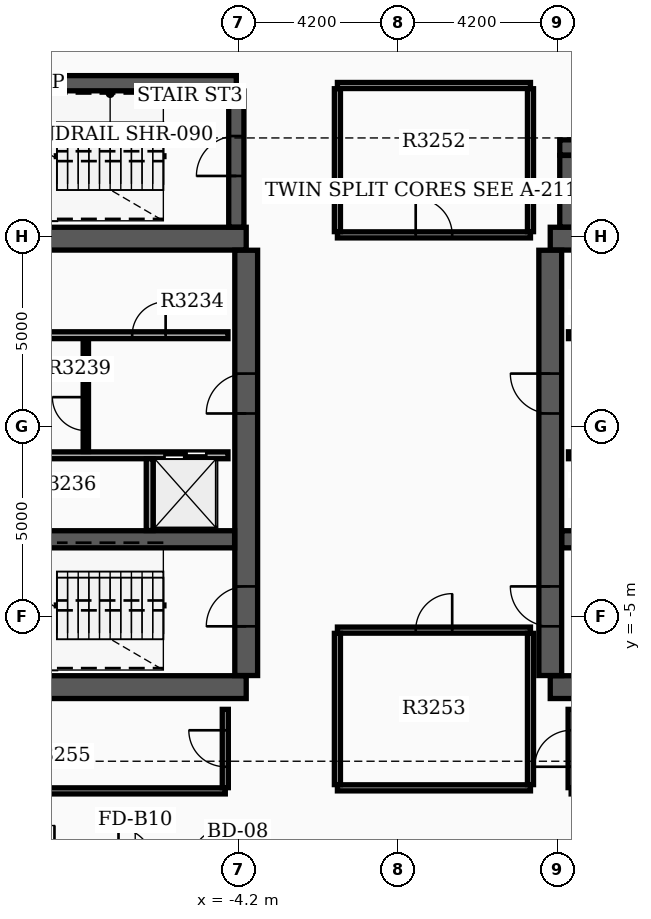
"""IFC4 building model, lengths in metres.
Left out: names, types, materials, properties, quantities, classifications, styles, units other than length and angle.
Written with IfcOpenShell. Run it as: python <this file> out.ifc"""

import sys

from ifc_helpers import new_model, si_unit, direction, frame, frame_2d, origin, place, context, subcontext, project, spatial, rectangle, extrude, element, fill, save


model = new_model("IFC4")
c1 = context("Model", 3, precision=1e-05, world=origin(), true_north=direction((0.0, 1.0)))
c2 = subcontext(c1, "Body", "Model", "MODEL_VIEW")
j1 = project(units=[si_unit("LENGTHUNIT", "METRE"), si_unit("PLANEANGLEUNIT", "RADIAN")], contexts=[c1])
p1 = place(None, origin())
s1 = spatial("IfcSite", under=j1, at=p1, CompositionType="ELEMENT")
p2 = place(p1, origin())
s2 = spatial("IfcBuilding", under=s1, at=p2, CompositionType="ELEMENT")
p3 = place(p2, frame((0.0, 0.0, 205.2)))
s3 = spatial("IfcBuildingStorey", under=s2, at=p3, CompositionType="ELEMENT", Elevation=205.2)
for number, where, z_axis, x_axis in (
    (1, (-12.4, -6.85, 0.0), (0.0, 0.0, 1.0), (1.0, 0.0, 0.0)),
    (2, (-12.4, 4.95, 0.0), (0.0, 0.0, 1.0), (1.0, 0.0, 0.0)),
):
    element("IfcWall", number, at=place(p3, frame(where, z_axis=z_axis, x_axis=x_axis)), inside=s3, PredefinedType="SHEAR", context=c2, shape_type="SweptSolid", body=[
        extrude(rectangle(XDim=8.4, YDim=0.6, at=frame_2d((4.2, 0.0))), origin(), (0.0, 0.0, 1.0), 3.7),
    ])
p4 = place(p3, frame((-4.0, -6.545, 0.0), z_axis=(0.0, 0.0, 1.0), x_axis=(0.0, 1.0, 0.0)))
e3 = element("IfcWall", 3, at=p4, inside=s3, PredefinedType="SHEAR", context=c2, shape_type="SweptSolid", body=[
    extrude(rectangle(XDim=11.19, YDim=0.6, at=frame_2d((5.595, 0.0))), origin(), (0.0, 0.0, 1.0), 3.7),
])
p5 = place(p4, frame((1.295, 0.0, 0.0)))
e4 = element("IfcOpeningElement", 4, at=p5, cuts=e3, PredefinedType="OPENING", context=c2, shape_type="SweptSolid", body=[
    extrude(rectangle(XDim=1.05, YDim=2.15, at=frame_2d((0.525, 1.075))), frame((0.0, 0.31, 0.0), z_axis=(0.0, -1.0, 0.0), x_axis=(1.0, 0.0, 0.0)), (0.0, 0.0, 1.0), 0.62),
])
p6 = place(p4, frame((6.895, 0.0, 0.0)))
e5 = element("IfcOpeningElement", 5, at=p6, cuts=e3, PredefinedType="OPENING", context=c2, shape_type="SweptSolid", body=[
    extrude(rectangle(XDim=1.05, YDim=2.15, at=frame_2d((0.525, 1.075))), frame((0.0, 0.31, 0.0), z_axis=(0.0, -1.0, 0.0), x_axis=(1.0, 0.0, 0.0)), (0.0, 0.0, 1.0), 0.62),
])
p7 = place(p3, frame((-12.095, -2.96, 0.0), z_axis=(0.0, 0.0, 1.0), x_axis=(1.0, 0.0, 0.0)))
e6 = element("IfcWall", 6, at=p7, inside=s3, PredefinedType="SHEAR", context=c2, shape_type="SweptSolid", body=[
    extrude(rectangle(XDim=7.79, YDim=0.45, at=frame_2d((3.895, 0.0))), origin(), (0.0, 0.0, 1.0), 3.7),
])
for number, where, z_axis, x_axis in (
    (7, (4.0, -6.85, 0.0), (0.0, 0.0, 1.0), (1.0, 0.0, 0.0)),
    (8, (4.0, 4.95, 0.0), (0.0, 0.0, 1.0), (1.0, 0.0, 0.0)),
):
    element("IfcWall", number, at=place(p3, frame(where, z_axis=z_axis, x_axis=x_axis)), inside=s3, PredefinedType="SHEAR", context=c2, shape_type="SweptSolid", body=[
        extrude(rectangle(XDim=8.4, YDim=0.6, at=frame_2d((4.2, 0.0))), origin(), (0.0, 0.0, 1.0), 3.7),
    ])
p8 = place(p3, frame((4.0, -6.545, 0.0), z_axis=(0.0, 0.0, 1.0), x_axis=(0.0, 1.0, 0.0)))
e9 = element("IfcWall", 9, at=p8, inside=s3, PredefinedType="SHEAR", context=c2, shape_type="SweptSolid", body=[
    extrude(rectangle(XDim=11.19, YDim=0.6, at=frame_2d((5.595, 0.0))), origin(), (0.0, 0.0, 1.0), 3.7),
])
p9 = place(p8, frame((1.295, 0.0, 0.0)))
e10 = element("IfcOpeningElement", 10, at=p9, cuts=e9, PredefinedType="OPENING", context=c2, shape_type="SweptSolid", body=[
    extrude(rectangle(XDim=1.05, YDim=2.15, at=frame_2d((0.525, 1.075))), frame((0.0, 0.31, 0.0), z_axis=(0.0, -1.0, 0.0), x_axis=(1.0, 0.0, 0.0)), (0.0, 0.0, 1.0), 0.62),
])
p10 = place(p8, frame((6.895, 0.0, 0.0)))
e11 = element("IfcOpeningElement", 11, at=p10, cuts=e9, PredefinedType="OPENING", context=c2, shape_type="SweptSolid", body=[
    extrude(rectangle(XDim=1.05, YDim=2.15, at=frame_2d((0.525, 1.075))), frame((0.0, 0.31, 0.0), z_axis=(0.0, -1.0, 0.0), x_axis=(1.0, 0.0, 0.0)), (0.0, 0.0, 1.0), 0.62),
])
p11 = place(p3, frame((4.305, -2.96, 0.0), z_axis=(0.0, 0.0, 1.0), x_axis=(1.0, 0.0, 0.0)))
e12 = element("IfcWall", 12, at=p11, inside=s3, PredefinedType="SHEAR", context=c2, shape_type="SweptSolid", body=[
    extrude(rectangle(XDim=7.79, YDim=0.45, at=frame_2d((3.895, 0.0))), origin(), (0.0, 0.0, 1.0), 3.7),
])
p12 = place(p3, frame((-12.22, 9.04, 0.0), z_axis=(0.0, 0.0, 1.0), x_axis=(1.0, 0.0, 0.0)))
e13 = element("IfcWall", 13, at=p12, inside=s3, PredefinedType="SHEAR", context=c2, shape_type="SweptSolid", body=[
    extrude(rectangle(XDim=7.96, YDim=0.4, at=frame_2d((3.98, 0.0))), origin(), (0.0, 0.0, 1.0), 3.7),
])
p13 = place(p3, frame((-4.26, 5.255, 0.0), z_axis=(0.0, 0.0, 1.0), x_axis=(0.0, 1.0, 0.0)))
e14 = element("IfcWall", 14, at=p13, inside=s3, PredefinedType="SHEAR", context=c2, shape_type="SweptSolid", body=[
    extrude(rectangle(XDim=3.58, YDim=0.4, at=frame_2d((1.79, 0.0))), origin(), (0.0, 0.0, 1.0), 3.7),
])
p14 = place(p13, frame((1.345, 0.0, 0.0)))
e15 = element("IfcOpeningElement", 15, at=p14, cuts=e14, PredefinedType="OPENING", context=c2, shape_type="SweptSolid", body=[
    extrude(rectangle(XDim=1.05, YDim=2.15, at=frame_2d((0.525, 1.075))), frame((0.0, 0.21, 0.0), z_axis=(0.0, -1.0, 0.0), x_axis=(1.0, 0.0, 0.0)), (0.0, 0.0, 1.0), 0.42),
])
p15 = place(p3, frame((4.45, 5.255, 0.0), z_axis=(0.0, 0.0, 1.0), x_axis=(0.0, 1.0, 0.0)))
e16 = element("IfcWall", 16, at=p15, inside=s3, PredefinedType="SHEAR", context=c2, shape_type="SweptSolid", body=[
    extrude(rectangle(XDim=1.885, YDim=0.4, at=frame_2d((0.942, 0.0))), origin(), (0.0, 0.0, 1.0), 3.7),
])
p16 = place(p3, frame((4.25, 7.35, 0.0), z_axis=(0.0, 0.0, 1.0), x_axis=(1.0, 0.0, 0.0)))
e17 = element("IfcWall", 17, at=p16, inside=s3, PredefinedType="SHEAR", context=c2, shape_type="SweptSolid", body=[
    extrude(rectangle(XDim=5.4, YDim=0.4, at=frame_2d((2.7, 0.0))), origin(), (0.0, 0.0, 1.0), 3.7),
])
p17 = place(p3, frame((-11.9, 2.41, 0.0), z_axis=(0.0, 0.0, 1.0), x_axis=(1.0, 0.0, 0.0)))
e18 = element("IfcWall", 18, at=p17, inside=s3, PredefinedType="SOLIDWALL", context=c2, shape_type="SweptSolid", body=[
    extrude(rectangle(XDim=7.42, YDim=0.18, at=frame_2d((3.71, 0.0))), origin(), (0.0, 0.0, 1.0), 3.17),
])
p18 = place(p17, frame((0.55, 0.0, 0.0)))
e19 = element("IfcOpeningElement", 19, at=p18, cuts=e18, PredefinedType="OPENING", context=c2, shape_type="SweptSolid", body=[
    extrude(rectangle(XDim=1.1, YDim=2.15, at=frame_2d((0.55, 1.075))), frame((0.0, 0.1, 0.0), z_axis=(0.0, -1.0, 0.0), x_axis=(1.0, 0.0, 0.0)), (0.0, 0.0, 1.0), 0.2),
])
p19 = place(p17, frame((4.9, 0.0, 0.0)))
e20 = element("IfcOpeningElement", 20, at=p19, cuts=e18, PredefinedType="OPENING", context=c2, shape_type="SweptSolid", body=[
    extrude(rectangle(XDim=0.88, YDim=2.1, at=frame_2d((0.44, 1.05))), frame((0.0, 0.1, 0.0), z_axis=(0.0, -1.0, 0.0), x_axis=(1.0, 0.0, 0.0)), (0.0, 0.0, 1.0), 0.2),
])
p20 = place(p3, frame((4.48, 2.41, 0.0), z_axis=(0.0, 0.0, 1.0), x_axis=(1.0, 0.0, 0.0)))
e21 = element("IfcWall", 21, at=p20, inside=s3, PredefinedType="SOLIDWALL", context=c2, shape_type="SweptSolid", body=[
    extrude(rectangle(XDim=7.42, YDim=0.18, at=frame_2d((3.71, 0.0))), origin(), (0.0, 0.0, 1.0), 3.17),
])
p21 = place(p20, frame((5.67, 0.0, 0.0)))
e22 = element("IfcOpeningElement", 22, at=p21, cuts=e21, PredefinedType="OPENING", context=c2, shape_type="SweptSolid", body=[
    extrude(rectangle(XDim=1.1, YDim=2.15, at=frame_2d((0.55, 1.075))), frame((0.0, 0.1, 0.0), z_axis=(0.0, -1.0, 0.0), x_axis=(1.0, 0.0, 0.0)), (0.0, 0.0, 1.0), 0.2),
])
p22 = place(p20, frame((1.6, 0.0, 0.0)))
e23 = element("IfcOpeningElement", 23, at=p22, cuts=e21, PredefinedType="OPENING", context=c2, shape_type="SweptSolid", body=[
    extrude(rectangle(XDim=0.88, YDim=2.1, at=frame_2d((0.44, 1.05))), frame((0.0, 0.1, 0.0), z_axis=(0.0, -1.0, 0.0), x_axis=(1.0, 0.0, 0.0)), (0.0, 0.0, 1.0), 0.2),
])
p23 = place(p3, frame((-11.9, -0.75, 0.0), z_axis=(0.0, 0.0, 1.0), x_axis=(1.0, 0.0, 0.0)))
e24 = element("IfcWall", 24, at=p23, inside=s3, PredefinedType="SOLIDWALL", context=c2, shape_type="SweptSolid", body=[
    extrude(rectangle(XDim=7.42, YDim=0.18, at=frame_2d((3.71, 0.0))), origin(), (0.0, 0.0, 1.0), 3.17),
])
p24 = place(p23, frame((5.75, 0.0, 0.0)))
e25 = element("IfcOpeningElement", 25, at=p24, cuts=e24, PredefinedType="OPENING", context=c2, shape_type="SweptSolid", body=[
    extrude(rectangle(XDim=1.1, YDim=2.15, at=frame_2d((0.55, 1.075))), frame((0.0, 0.1, 0.0), z_axis=(0.0, -1.0, 0.0), x_axis=(1.0, 0.0, 0.0)), (0.0, 0.0, 1.0), 0.2),
])
p25 = place(p23, frame((1.6, 0.0, 0.0)))
e26 = element("IfcOpeningElement", 26, at=p25, cuts=e24, PredefinedType="OPENING", context=c2, shape_type="SweptSolid", body=[
    extrude(rectangle(XDim=0.88, YDim=2.1, at=frame_2d((0.44, 1.05))), frame((0.0, 0.1, 0.0), z_axis=(0.0, -1.0, 0.0), x_axis=(1.0, 0.0, 0.0)), (0.0, 0.0, 1.0), 0.2),
])
p26 = place(p3, frame((4.48, -0.75, 0.0), z_axis=(0.0, 0.0, 1.0), x_axis=(1.0, 0.0, 0.0)))
e27 = element("IfcWall", 27, at=p26, inside=s3, PredefinedType="SOLIDWALL", context=c2, shape_type="SweptSolid", body=[
    extrude(rectangle(XDim=7.42, YDim=0.18, at=frame_2d((3.71, 0.0))), origin(), (0.0, 0.0, 1.0), 3.17),
])
p27 = place(p26, frame((3.92, 0.0, 0.0)))
e28 = element("IfcOpeningElement", 28, at=p27, cuts=e27, PredefinedType="OPENING", context=c2, shape_type="SweptSolid", body=[
    extrude(rectangle(XDim=1.1, YDim=2.15, at=frame_2d((0.55, 1.075))), frame((0.0, 0.1, 0.0), z_axis=(0.0, -1.0, 0.0), x_axis=(1.0, 0.0, 0.0)), (0.0, 0.0, 1.0), 0.2),
])
p28 = place(p26, frame((5.82, 0.0, 0.0)))
e29 = element("IfcOpeningElement", 29, at=p28, cuts=e27, PredefinedType="OPENING", context=c2, shape_type="SweptSolid", body=[
    extrude(rectangle(XDim=1.1, YDim=2.15, at=frame_2d((0.55, 1.075))), frame((0.0, 0.1, 0.0), z_axis=(0.0, -1.0, 0.0), x_axis=(1.0, 0.0, 0.0)), (0.0, 0.0, 1.0), 0.2),
])
p29 = place(p26, frame((1.6, 0.0, 0.0)))
e30 = element("IfcOpeningElement", 30, at=p29, cuts=e27, PredefinedType="OPENING", context=c2, shape_type="SweptSolid", body=[
    extrude(rectangle(XDim=0.88, YDim=2.1, at=frame_2d((0.44, 1.05))), frame((0.0, 0.1, 0.0), z_axis=(0.0, -1.0, 0.0), x_axis=(1.0, 0.0, 0.0)), (0.0, 0.0, 1.0), 0.2),
])
p30 = place(p3, frame((-6.54, -2.73, 0.0), z_axis=(0.0, 0.0, 1.0), x_axis=(0.0, 1.0, 0.0)))
e31 = element("IfcWall", 31, at=p30, inside=s3, PredefinedType="SOLIDWALL", context=c2, shape_type="SweptSolid", body=[
    extrude(rectangle(XDim=1.89, YDim=0.18, at=frame_2d((0.945, 0.0))), origin(), (0.0, 0.0, 1.0), 3.17),
])
p31 = place(p3, frame((-8.22, -0.65, 0.0), z_axis=(0.0, 0.0, 1.0), x_axis=(0.0, 1.0, 0.0)))
e32 = element("IfcWall", 32, at=p31, inside=s3, PredefinedType="SOLIDWALL", context=c2, shape_type="SweptSolid", body=[
    extrude(rectangle(XDim=2.96, YDim=0.14, at=frame_2d((1.48, 0.0))), origin(), (0.0, 0.0, 1.0), 3.17),
])
p32 = place(p31, frame((0.55, 0.0, 0.0)))
e33 = element("IfcOpeningElement", 33, at=p32, cuts=e32, PredefinedType="OPENING", context=c2, shape_type="SweptSolid", body=[
    extrude(rectangle(XDim=0.88, YDim=2.1, at=frame_2d((0.44, 1.05))), frame((0.0, 0.08, 0.0), z_axis=(0.0, -1.0, 0.0), x_axis=(1.0, 0.0, 0.0)), (0.0, 0.0, 1.0), 0.16),
])
p33 = place(p3, frame((-1.6, 5.05, 0.0), z_axis=(0.0, 0.0, 1.0), x_axis=(1.0, 0.0, 0.0)))
e34 = element("IfcWall", 34, at=p33, inside=s3, PredefinedType="PARTITIONING", context=c2, shape_type="SweptSolid", body=[
    extrude(rectangle(XDim=5.08, YDim=0.16, at=frame_2d((2.54, 0.0))), origin(), (0.0, 0.0, 1.0), 3.17),
])
p34 = place(p33, frame((2.06, 0.0, 0.0)))
e35 = element("IfcOpeningElement", 35, at=p34, cuts=e34, PredefinedType="OPENING", context=c2, shape_type="SweptSolid", body=[
    extrude(rectangle(XDim=0.96, YDim=2.15, at=frame_2d((0.48, 1.075))), frame((0.0, 0.09, 0.0), z_axis=(0.0, -1.0, 0.0), x_axis=(1.0, 0.0, 0.0)), (0.0, 0.0, 1.0), 0.18),
])
p35 = place(p3, frame((-1.6, 8.98, 0.0), z_axis=(0.0, 0.0, 1.0), x_axis=(1.0, 0.0, 0.0)))
e36 = element("IfcWall", 36, at=p35, inside=s3, PredefinedType="PARTITIONING", context=c2, shape_type="SweptSolid", body=[
    extrude(rectangle(XDim=5.08, YDim=0.16, at=frame_2d((2.54, 0.0))), origin(), (0.0, 0.0, 1.0), 3.17),
])
for number, where, z_axis, x_axis in (
    (37, (-1.6, 5.135, 0.0), (0.0, 0.0, 1.0), (0.0, 1.0, 0.0)),
    (38, (3.48, 5.135, 0.0), (0.0, 0.0, 1.0), (0.0, 1.0, 0.0)),
):
    element("IfcWall", number, at=place(p3, frame(where, z_axis=z_axis, x_axis=x_axis)), inside=s3, PredefinedType="PARTITIONING", context=c2, shape_type="SweptSolid", body=[
        extrude(rectangle(XDim=3.76, YDim=0.16, at=frame_2d((1.88, 0.0))), origin(), (0.0, 0.0, 1.0), 3.17),
    ])
p36 = place(p3, frame((-1.6, -9.5, 0.0), z_axis=(0.0, 0.0, 1.0), x_axis=(1.0, 0.0, 0.0)))
e39 = element("IfcWall", 39, at=p36, inside=s3, PredefinedType="PARTITIONING", context=c2, shape_type="SweptSolid", body=[
    extrude(rectangle(XDim=5.08, YDim=0.16, at=frame_2d((2.54, 0.0))), origin(), (0.0, 0.0, 1.0), 3.17),
])
p37 = place(p3, frame((-1.6, -5.35, 0.0), z_axis=(0.0, 0.0, 1.0), x_axis=(1.0, 0.0, 0.0)))
e40 = element("IfcWall", 40, at=p37, inside=s3, PredefinedType="PARTITIONING", context=c2, shape_type="SweptSolid", body=[
    extrude(rectangle(XDim=5.08, YDim=0.16, at=frame_2d((2.54, 0.0))), origin(), (0.0, 0.0, 1.0), 3.17),
])
p38 = place(p37, frame((2.06, 0.0, 0.0)))
e41 = element("IfcOpeningElement", 41, at=p38, cuts=e40, PredefinedType="OPENING", context=c2, shape_type="SweptSolid", body=[
    extrude(rectangle(XDim=0.96, YDim=2.15, at=frame_2d((0.48, 1.075))), frame((0.0, 0.09, 0.0), z_axis=(0.0, -1.0, 0.0), x_axis=(1.0, 0.0, 0.0)), (0.0, 0.0, 1.0), 0.18),
])
for number, where, z_axis, x_axis in (
    (42, (-1.6, -9.415, 0.0), (0.0, 0.0, 1.0), (0.0, 1.0, 0.0)),
    (43, (3.48, -9.415, 0.0), (0.0, 0.0, 1.0), (0.0, 1.0, 0.0)),
):
    element("IfcWall", number, at=place(p3, frame(where, z_axis=z_axis, x_axis=x_axis)), inside=s3, PredefinedType="PARTITIONING", context=c2, shape_type="SweptSolid", body=[
        extrude(rectangle(XDim=3.98, YDim=0.16, at=frame_2d((1.99, 0.0))), origin(), (0.0, 0.0, 1.0), 3.17),
    ])
p39 = place(p3, frame((4.55, -9.58, 0.0), z_axis=(0.0, 0.0, 1.0), x_axis=(1.0, 0.0, 0.0)))
e44 = element("IfcWall", 44, at=p39, inside=s3, PredefinedType="PARTITIONING", context=c2, shape_type="SweptSolid", body=[
    extrude(rectangle(XDim=8.1, YDim=0.16, at=frame_2d((4.05, 0.0))), origin(), (0.0, 0.0, 1.0), 3.17),
])
p40 = place(p3, frame((4.55, -9.495, 0.0), z_axis=(0.0, 0.0, 1.0), x_axis=(0.0, 1.0, 0.0)))
e45 = element("IfcWall", 45, at=p40, inside=s3, PredefinedType="PARTITIONING", context=c2, shape_type="SweptSolid", body=[
    extrude(rectangle(XDim=2.06, YDim=0.16, at=frame_2d((1.03, 0.0))), origin(), (0.0, 0.0, 1.0), 3.17),
])
p41 = place(p40, frame((0.55, 0.0, 0.0)))
e46 = element("IfcOpeningElement", 46, at=p41, cuts=e45, PredefinedType="OPENING", context=c2, shape_type="SweptSolid", body=[
    extrude(rectangle(XDim=0.96, YDim=2.15, at=frame_2d((0.48, 1.075))), frame((0.0, 0.09, 0.0), z_axis=(0.0, -1.0, 0.0), x_axis=(1.0, 0.0, 0.0)), (0.0, 0.0, 1.0), 0.18),
])
p42 = place(p3, frame((-12.65, -9.58, 0.0), z_axis=(0.0, 0.0, 1.0), x_axis=(1.0, 0.0, 0.0)))
e47 = element("IfcWall", 47, at=p42, inside=s3, PredefinedType="PARTITIONING", context=c2, shape_type="SweptSolid", body=[
    extrude(rectangle(XDim=8.1, YDim=0.16, at=frame_2d((4.05, 0.0))), origin(), (0.0, 0.0, 1.0), 3.17),
])
p43 = place(p3, frame((-4.55, -9.495, 0.0), z_axis=(0.0, 0.0, 1.0), x_axis=(0.0, 1.0, 0.0)))
e48 = element("IfcWall", 48, at=p43, inside=s3, PredefinedType="PARTITIONING", context=c2, shape_type="SweptSolid", body=[
    extrude(rectangle(XDim=2.06, YDim=0.16, at=frame_2d((1.03, 0.0))), origin(), (0.0, 0.0, 1.0), 3.17),
])
p44 = place(p43, frame((0.55, 0.0, 0.0)))
e49 = element("IfcOpeningElement", 49, at=p44, cuts=e48, PredefinedType="OPENING", context=c2, shape_type="SweptSolid", body=[
    extrude(rectangle(XDim=0.96, YDim=2.15, at=frame_2d((0.48, 1.075))), frame((0.0, 0.09, 0.0), z_axis=(0.0, -1.0, 0.0), x_axis=(1.0, 0.0, 0.0)), (0.0, 0.0, 1.0), 0.18),
])
p45 = place(p5, origin())
e50 = element("IfcDoor", 50, at=p45, inside=s3, OperationType="SINGLE_SWING_LEFT", PredefinedType="DOOR", context=c2, shape_type="SweptSolid", body=[
    extrude(rectangle(XDim=1.05, YDim=2.15, at=frame_2d((0.525, 1.075))), frame((0.0, 0.025, 0.0), z_axis=(0.0, -1.0, 0.0), x_axis=(1.0, 0.0, 0.0)), (0.0, 0.0, 1.0), 0.05),
])
fill(e4, e50)
p46 = place(p9, origin())
e51 = element("IfcDoor", 51, at=p46, inside=s3, OperationType="SINGLE_SWING_RIGHT", PredefinedType="DOOR", context=c2, shape_type="SweptSolid", body=[
    extrude(rectangle(XDim=1.05, YDim=2.15, at=frame_2d((0.525, 1.075))), frame((0.0, 0.025, 0.0), z_axis=(0.0, -1.0, 0.0), x_axis=(1.0, 0.0, 0.0)), (0.0, 0.0, 1.0), 0.05),
])
fill(e10, e51)
p47 = place(p6, origin())
e52 = element("IfcDoor", 52, at=p47, inside=s3, OperationType="SINGLE_SWING_LEFT", PredefinedType="DOOR", context=c2, shape_type="SweptSolid", body=[
    extrude(rectangle(XDim=1.05, YDim=2.15, at=frame_2d((0.525, 1.075))), frame((0.0, 0.025, 0.0), z_axis=(0.0, -1.0, 0.0), x_axis=(1.0, 0.0, 0.0)), (0.0, 0.0, 1.0), 0.05),
])
fill(e5, e52)
p48 = place(p10, origin())
e53 = element("IfcDoor", 53, at=p48, inside=s3, OperationType="SINGLE_SWING_RIGHT", PredefinedType="DOOR", context=c2, shape_type="SweptSolid", body=[
    extrude(rectangle(XDim=1.05, YDim=2.15, at=frame_2d((0.525, 1.075))), frame((0.0, 0.025, 0.0), z_axis=(0.0, -1.0, 0.0), x_axis=(1.0, 0.0, 0.0)), (0.0, 0.0, 1.0), 0.05),
])
fill(e11, e53)
p49 = place(p14, origin())
e54 = element("IfcDoor", 54, at=p49, inside=s3, OperationType="SINGLE_SWING_LEFT", PredefinedType="DOOR", context=c2, shape_type="SweptSolid", body=[
    extrude(rectangle(XDim=1.05, YDim=2.15, at=frame_2d((0.525, 1.075))), frame((0.0, 0.025, 0.0), z_axis=(0.0, -1.0, 0.0), x_axis=(1.0, 0.0, 0.0)), (0.0, 0.0, 1.0), 0.05),
])
fill(e15, e54)
p50 = place(p24, origin())
e55 = element("IfcDoor", 55, at=p50, inside=s3, OperationType="DOUBLE_DOOR_SLIDING", PredefinedType="DOOR", context=c2, shape_type="SweptSolid", body=[
    extrude(rectangle(XDim=1.1, YDim=2.15, at=frame_2d((0.55, 1.075))), frame((0.0, 0.025, 0.0), z_axis=(0.0, -1.0, 0.0), x_axis=(1.0, 0.0, 0.0)), (0.0, 0.0, 1.0), 0.05),
])
fill(e25, e55)
p51 = place(p19, origin())
e56 = element("IfcDoor", 56, at=p51, inside=s3, OperationType="SINGLE_SWING_RIGHT", PredefinedType="DOOR", context=c2, shape_type="SweptSolid", body=[
    extrude(rectangle(XDim=0.88, YDim=2.1, at=frame_2d((0.44, 1.05))), frame((0.0, 0.025, 0.0), z_axis=(0.0, -1.0, 0.0), x_axis=(1.0, 0.0, 0.0)), (0.0, 0.0, 1.0), 0.05),
])
fill(e20, e56)
p52 = place(p32, origin())
e57 = element("IfcDoor", 57, at=p52, inside=s3, OperationType="SINGLE_SWING_RIGHT", PredefinedType="DOOR", context=c2, shape_type="SweptSolid", body=[
    extrude(rectangle(XDim=0.88, YDim=2.1, at=frame_2d((0.44, 1.05))), frame((0.0, 0.025, 0.0), z_axis=(0.0, -1.0, 0.0), x_axis=(1.0, 0.0, 0.0)), (0.0, 0.0, 1.0), 0.05),
])
fill(e33, e57)
p53 = place(p34, origin())
e58 = element("IfcDoor", 58, at=p53, inside=s3, OperationType="SINGLE_SWING_LEFT", PredefinedType="DOOR", context=c2, shape_type="SweptSolid", body=[
    extrude(rectangle(XDim=0.96, YDim=2.15, at=frame_2d((0.48, 1.075))), frame((0.0, 0.025, 0.0), z_axis=(0.0, -1.0, 0.0), x_axis=(1.0, 0.0, 0.0)), (0.0, 0.0, 1.0), 0.05),
])
fill(e35, e58)
p54 = place(p38, origin())
e59 = element("IfcDoor", 59, at=p54, inside=s3, OperationType="SINGLE_SWING_RIGHT", PredefinedType="DOOR", context=c2, shape_type="SweptSolid", body=[
    extrude(rectangle(XDim=0.96, YDim=2.15, at=frame_2d((0.48, 1.075))), frame((0.0, 0.025, 0.0), z_axis=(0.0, -1.0, 0.0), x_axis=(1.0, 0.0, 0.0)), (0.0, 0.0, 1.0), 0.05),
])
fill(e41, e59)
p55 = place(p41, origin())
e60 = element("IfcDoor", 60, at=p55, inside=s3, OperationType="SINGLE_SWING_LEFT", PredefinedType="DOOR", context=c2, shape_type="SweptSolid", body=[
    extrude(rectangle(XDim=0.96, YDim=2.15, at=frame_2d((0.48, 1.075))), frame((0.0, 0.025, 0.0), z_axis=(0.0, -1.0, 0.0), x_axis=(1.0, 0.0, 0.0)), (0.0, 0.0, 1.0), 0.05),
])
fill(e46, e60)
p56 = place(p44, origin())
e61 = element("IfcDoor", 61, at=p56, inside=s3, OperationType="SINGLE_SWING_RIGHT", PredefinedType="DOOR", context=c2, shape_type="SweptSolid", body=[
    extrude(rectangle(XDim=0.96, YDim=2.15, at=frame_2d((0.48, 1.075))), frame((0.0, 0.025, 0.0), z_axis=(0.0, -1.0, 0.0), x_axis=(1.0, 0.0, 0.0)), (0.0, 0.0, 1.0), 0.05),
])
fill(e49, e61)
save(model, sys.argv[1])
